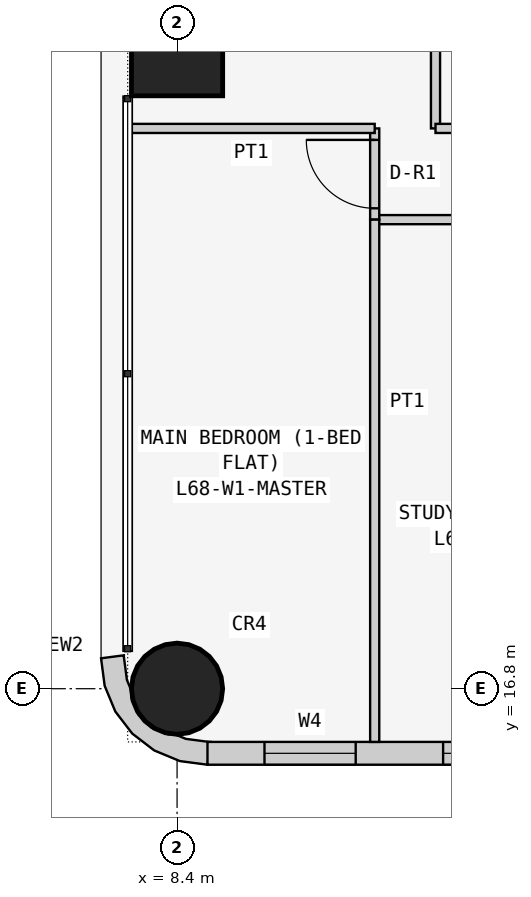
"""IFC4 building model, lengths in metres.
Left out: names, types, materials, properties, quantities, classifications, styles, units other than length and angle.
Written with IfcOpenShell. Run it as: python <this file> out.ifc"""

import sys

from ifc_helpers import new_model, si_unit, direction, frame, frame_2d, origin, origin_2d, place, context, subcontext, project, spatial, polyline, rectangle, circle, outline, extrude, element, fill, save


model = new_model("IFC4")
c1 = context("Model", 3, precision=1e-05, world=origin(), true_north=direction((0.0, 1.0)))
c2 = subcontext(c1, "Body", "Model", "MODEL_VIEW")
j1 = project(units=[si_unit("LENGTHUNIT", "METRE"), si_unit("PLANEANGLEUNIT", "RADIAN")], contexts=[c1])
p1 = place(None, origin())
s1 = spatial("IfcSite", under=j1, at=p1, CompositionType="ELEMENT")
p2 = place(p1, origin())
s2 = spatial("IfcBuilding", under=s1, at=p2, CompositionType="ELEMENT")
p3 = place(p2, frame((0.0, 0.0, 261.3)))
s3 = spatial("IfcBuildingStorey", under=s2, at=p3, CompositionType="ELEMENT", Elevation=261.3)
p4 = place(p3, frame((8.4, 16.8, 0.0), z_axis=(0.0, 0.0, 1.0), x_axis=(1.0, 0.0, 0.0)))
e1 = element("IfcColumn", 1, at=p4, inside=s3, PredefinedType="COLUMN", context=c2, shape_type="SweptSolid", body=[
    extrude(circle(Radius=0.6, at=origin_2d()), origin(), (0.0, 0.0, 1.0), 3.6),
])
p5 = place(p3, frame((8.4, 25.2, 0.0), z_axis=(0.0, 0.0, 1.0), x_axis=(1.0, 0.0, 0.0)))
e2 = element("IfcColumn", 2, at=p5, inside=s3, PredefinedType="COLUMN", context=c2, shape_type="SweptSolid", body=[
    extrude(rectangle(XDim=1.2, YDim=1.2, at=origin_2d()), origin(), (0.0, 0.0, 1.0), 3.6),
])
p6 = place(p3, frame((8.8, 15.95, 0.0), z_axis=(0.0, 0.0, 1.0), x_axis=(1.0, 0.0, 0.0)))
e3 = element("IfcWall", 3, at=p6, inside=s3, PredefinedType="SOLIDWALL", context=c2, shape_type="SweptSolid", body=[
    extrude(rectangle(XDim=7.3, YDim=0.3, at=frame_2d((3.65, 0.0))), origin(), (0.0, 0.0, 1.0), 3.45),
])
p7 = place(p6, frame((3.1, 0.0, 0.9)))
e4 = element("IfcOpeningElement", 4, at=p7, cuts=e3, PredefinedType="OPENING", context=c2, shape_type="SweptSolid", body=[
    extrude(rectangle(XDim=2.4, YDim=1.5, at=frame_2d((1.2, 0.75))), frame((0.0, 0.16, 0.0), z_axis=(0.0, -1.0, 0.0), x_axis=(1.0, 0.0, 0.0)), (0.0, 0.0, 1.0), 0.32),
])
p8 = place(p6, frame((0.75, 0.0, 0.9)))
e5 = element("IfcOpeningElement", 5, at=p8, cuts=e3, PredefinedType="OPENING", context=c2, shape_type="SweptSolid", body=[
    extrude(rectangle(XDim=1.2, YDim=1.5, at=frame_2d((0.6, 0.75))), frame((0.0, 0.16, 0.0), z_axis=(0.0, -1.0, 0.0), x_axis=(1.0, 0.0, 0.0)), (0.0, 0.0, 1.0), 0.32),
])
p9 = place(p3, frame((7.824, 17.162, 0.0), z_axis=(0.0, 0.0, 1.0), x_axis=(-0.707106781187, -0.707106781187, 0.0)))
e6 = element("IfcWall", 6, at=p9, inside=s3, PredefinedType="SOLIDWALL", context=c2, shape_type="SweptSolid", body=[
    extrude(outline(polyline([(0.047, 1.454), (0.233, 1.212), (0.292, 1.069), (0.358, 1.003), (0.449, 0.782), (0.449, 0.543), (0.358, 0.323), (0.292, 0.257), (0.233, 0.114), (0.047, -0.129), (0.033, -0.143), (0.273, -0.327), (0.495, -0.037), (0.635, 0.301), (0.683, 0.663), (0.635, 1.025), (0.495, 1.363), (0.273, 1.653), (0.033, 1.469), (0.047, 1.454)])), origin(), (0.0, 0.0, 1.0), 3.45),
])
p10 = place(p3, frame((11.8, 29.4, 0.0), z_axis=(0.0, 0.0, 1.0), x_axis=(0.0, -1.0, 0.0)))
e7 = element("IfcWall", 7, at=p10, inside=s3, PredefinedType="PARTITIONING", context=c2, shape_type="SweptSolid", body=[
    extrude(rectangle(XDim=5.229, YDim=0.12, at=frame_2d((2.615, 0.0))), origin(), (0.0, 0.0, 1.0), 3.45),
])
p11 = place(p3, frame((11.8, 24.171, 0.0), z_axis=(0.0, 0.0, 1.0), x_axis=(1.0, 0.0, 0.0)))
e8 = element("IfcWall", 8, at=p11, inside=s3, PredefinedType="PARTITIONING", context=c2, shape_type="SweptSolid", body=[
    extrude(rectangle(XDim=2.0, YDim=0.12, at=frame_2d((1.0, 0.0))), origin(), (0.0, 0.0, 1.0), 3.45),
])
p12 = place(p11, frame((0.55, 0.0, 0.0)))
e9 = element("IfcOpeningElement", 9, at=p12, cuts=e8, PredefinedType="OPENING", context=c2, shape_type="SweptSolid", body=[
    extrude(rectangle(XDim=0.9, YDim=2.1, at=frame_2d((0.45, 1.05))), frame((0.0, 0.07, 0.0), z_axis=(0.0, -1.0, 0.0), x_axis=(1.0, 0.0, 0.0)), (0.0, 0.0, 1.0), 0.14),
])
p13 = place(p3, frame((14.4, 22.971, 0.0), z_axis=(0.0, 0.0, 1.0), x_axis=(-1.0, 0.0, 0.0)))
e10 = element("IfcWall", 10, at=p13, inside=s3, PredefinedType="PARTITIONING", context=c2, shape_type="SweptSolid", body=[
    extrude(rectangle(XDim=3.4, YDim=0.12, at=frame_2d((1.7, 0.0))), origin(), (0.0, 0.0, 1.0), 3.45),
])
p14 = place(p13, frame((1.25, 0.0, 0.0)))
e11 = element("IfcOpeningElement", 11, at=p14, cuts=e10, PredefinedType="OPENING", context=c2, shape_type="SweptSolid", body=[
    extrude(rectangle(XDim=0.9, YDim=2.1, at=frame_2d((0.45, 1.05))), frame((0.0, 0.07, 0.0), z_axis=(0.0, -1.0, 0.0), x_axis=(1.0, 0.0, 0.0)), (0.0, 0.0, 1.0), 0.14),
])
p15 = place(p3, frame((11.0, 22.971, 0.0), z_axis=(0.0, 0.0, 1.0), x_axis=(0.0, 1.0, 0.0)))
e12 = element("IfcWall", 12, at=p15, inside=s3, PredefinedType="PARTITIONING", context=c2, shape_type="SweptSolid", body=[
    extrude(rectangle(XDim=1.2, YDim=0.12, at=frame_2d((0.6, 0.0))), origin(), (0.0, 0.0, 1.0), 3.45),
])
p16 = place(p15, frame((0.149, 0.0, 0.0)))
e13 = element("IfcOpeningElement", 13, at=p16, cuts=e12, PredefinedType="OPENING", context=c2, shape_type="SweptSolid", body=[
    extrude(rectangle(XDim=0.9, YDim=2.1, at=frame_2d((0.45, 1.05))), frame((0.0, 0.07, 0.0), z_axis=(0.0, -1.0, 0.0), x_axis=(1.0, 0.0, 0.0)), (0.0, 0.0, 1.0), 0.14),
])
p17 = place(p3, frame((11.0, 24.171, 0.0), z_axis=(0.0, 0.0, 1.0), x_axis=(-1.0, 0.0, 0.0)))
e14 = element("IfcWall", 14, at=p17, inside=s3, PredefinedType="PARTITIONING", context=c2, shape_type="SweptSolid", body=[
    extrude(rectangle(XDim=3.25, YDim=0.12, at=frame_2d((1.625, 0.0))), origin(), (0.0, 0.0, 1.0), 3.45),
])
p18 = place(p3, frame((11.0, 22.971, 0.0), z_axis=(0.0, 0.0, 1.0), x_axis=(0.0, -1.0, 0.0)))
e15 = element("IfcWall", 15, at=p18, inside=s3, PredefinedType="PARTITIONING", context=c2, shape_type="SweptSolid", body=[
    extrude(rectangle(XDim=6.871, YDim=0.12, at=frame_2d((3.436, 0.0))), origin(), (0.0, 0.0, 1.0), 3.45),
])
p19 = place(p7, origin())
e16 = element("IfcWindow", 16, at=p19, inside=s3, PartitioningType="SINGLE_PANEL", PredefinedType="WINDOW", context=c2, shape_type="SweptSolid", body=[
    extrude(rectangle(XDim=2.4, YDim=1.5, at=frame_2d((1.2, 0.75))), frame((0.0, 0.03, 0.0), z_axis=(0.0, -1.0, 0.0), x_axis=(1.0, 0.0, 0.0)), (0.0, 0.0, 1.0), 0.06),
])
fill(e4, e16)
p20 = place(p8, origin())
e17 = element("IfcWindow", 17, at=p20, inside=s3, PartitioningType="SINGLE_PANEL", PredefinedType="WINDOW", context=c2, shape_type="SweptSolid", body=[
    extrude(rectangle(XDim=1.2, YDim=1.5, at=frame_2d((0.6, 0.75))), frame((0.0, 0.03, 0.0), z_axis=(0.0, -1.0, 0.0), x_axis=(1.0, 0.0, 0.0)), (0.0, 0.0, 1.0), 0.06),
])
fill(e5, e17)
p21 = place(p16, origin())
e18 = element("IfcDoor", 18, at=p21, inside=s3, OperationType="SINGLE_SWING_RIGHT", PredefinedType="DOOR", context=c2, shape_type="SweptSolid", body=[
    extrude(rectangle(XDim=0.9, YDim=2.1, at=frame_2d((0.45, 1.05))), frame((0.0, 0.025, 0.0), z_axis=(0.0, -1.0, 0.0), x_axis=(1.0, 0.0, 0.0)), (0.0, 0.0, 1.0), 0.05),
])
fill(e13, e18)
save(model, sys.argv[1])
